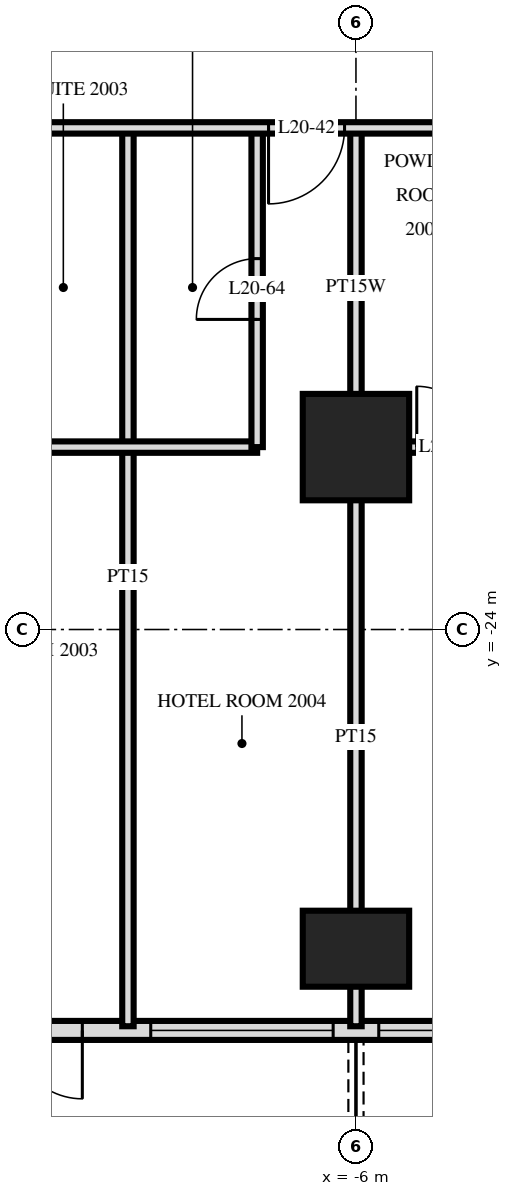
"""IFC4 building model, lengths in metres.
Left out: names, types, materials, properties, quantities, classifications, styles, units other than length and angle.
Written with IfcOpenShell. Run it as: python <this file> out.ifc"""

import sys

from ifc_helpers import new_model, si_unit, direction, frame, frame_2d, origin, origin_2d, place, context, subcontext, project, spatial, rectangle, extrude, element, fill, save


model = new_model("IFC4")
c1 = context("Model", 3, precision=1e-05, world=origin(), true_north=direction((0.0, 1.0)))
c2 = subcontext(c1, "Body", "Model", "MODEL_VIEW")
j1 = project(units=[si_unit("LENGTHUNIT", "METRE"), si_unit("PLANEANGLEUNIT", "RADIAN")], contexts=[c1])
p1 = place(None, origin())
s1 = spatial("IfcSite", under=j1, at=p1, CompositionType="ELEMENT")
p2 = place(p1, origin())
s2 = spatial("IfcBuilding", under=s1, at=p2, CompositionType="ELEMENT")
p3 = place(p2, frame((0.0, 0.0, 81.6)))
s3 = spatial("IfcBuildingStorey", under=s2, at=p3, CompositionType="ELEMENT", Elevation=81.6)
p4 = place(p3, frame((-6.0, -28.2, 0.0), z_axis=(0.0, 0.0, 1.0), x_axis=(1.0, 0.0, 0.0)))
e1 = element("IfcColumn", 1, at=p4, inside=s3, PredefinedType="COLUMN", context=c2, shape_type="SweptSolid", body=[
    extrude(rectangle(XDim=1.4, YDim=1.0, at=origin_2d()), origin(), (0.0, 0.0, 1.0), 3.6),
])
p5 = place(p3, frame((-6.0, -21.6, 0.0), z_axis=(0.0, 0.0, 1.0), x_axis=(1.0, 0.0, 0.0)))
e2 = element("IfcColumn", 2, at=p5, inside=s3, PredefinedType="COLUMN", context=c2, shape_type="SweptSolid", body=[
    extrude(rectangle(XDim=1.4, YDim=1.4, at=origin_2d()), origin(), (0.0, 0.0, 1.0), 3.6),
])
p6 = place(p3, frame((-28.775, -29.275, 0.0), z_axis=(0.0, 0.0, 1.0), x_axis=(1.0, 0.0, 0.0)))
e3 = element("IfcWall", 3, at=p6, inside=s3, PredefinedType="SOLIDWALL", context=c2, shape_type="SweptSolid", body=[
    extrude(rectangle(XDim=57.551, YDim=0.25, at=frame_2d((28.775, 0.0))), origin(), (0.0, 0.0, 1.0), 3.32),
])
p7 = place(p6, frame((0.575, 0.0, 0.0)))
e4 = element("IfcOpeningElement", 4, at=p7, cuts=e3, PredefinedType="OPENING", context=c2, shape_type="SweptSolid", body=[
    extrude(rectangle(XDim=1.8, YDim=2.4, at=frame_2d((0.9, 1.2))), frame((0.0, 0.135, 0.0), z_axis=(0.0, -1.0, 0.0), x_axis=(1.0, 0.0, 0.0)), (0.0, 0.0, 1.0), 0.27),
])
p8 = place(p6, frame((5.375, 0.0, 0.0)))
e5 = element("IfcOpeningElement", 5, at=p8, cuts=e3, PredefinedType="OPENING", context=c2, shape_type="SweptSolid", body=[
    extrude(rectangle(XDim=1.8, YDim=2.4, at=frame_2d((0.9, 1.2))), frame((0.0, 0.135, 0.0), z_axis=(0.0, -1.0, 0.0), x_axis=(1.0, 0.0, 0.0)), (0.0, 0.0, 1.0), 0.27),
])
p9 = place(p6, frame((8.075, 0.0, 0.3)))
e6 = element("IfcOpeningElement", 6, at=p9, cuts=e3, PredefinedType="OPENING", context=c2, shape_type="SweptSolid", body=[
    extrude(rectangle(XDim=2.4, YDim=2.1, at=frame_2d((1.2, 1.05))), frame((0.0, 0.135, 0.0), z_axis=(0.0, -1.0, 0.0), x_axis=(1.0, 0.0, 0.0)), (0.0, 0.0, 1.0), 0.27),
])
p10 = place(p6, frame((12.875, 0.0, 0.0)))
e7 = element("IfcOpeningElement", 7, at=p10, cuts=e3, PredefinedType="OPENING", context=c2, shape_type="SweptSolid", body=[
    extrude(rectangle(XDim=1.8, YDim=2.4, at=frame_2d((0.9, 1.2))), frame((0.0, 0.135, 0.0), z_axis=(0.0, -1.0, 0.0), x_axis=(1.0, 0.0, 0.0)), (0.0, 0.0, 1.0), 0.27),
])
p11 = place(p6, frame((17.375, 0.0, 0.0)))
e8 = element("IfcOpeningElement", 8, at=p11, cuts=e3, PredefinedType="OPENING", context=c2, shape_type="SweptSolid", body=[
    extrude(rectangle(XDim=1.8, YDim=2.4, at=frame_2d((0.9, 1.2))), frame((0.0, 0.135, 0.0), z_axis=(0.0, -1.0, 0.0), x_axis=(1.0, 0.0, 0.0)), (0.0, 0.0, 1.0), 0.27),
])
p12 = place(p6, frame((20.075, 0.0, 0.3)))
e9 = element("IfcOpeningElement", 9, at=p12, cuts=e3, PredefinedType="OPENING", context=c2, shape_type="SweptSolid", body=[
    extrude(rectangle(XDim=2.4, YDim=2.1, at=frame_2d((1.2, 1.05))), frame((0.0, 0.135, 0.0), z_axis=(0.0, -1.0, 0.0), x_axis=(1.0, 0.0, 0.0)), (0.0, 0.0, 1.0), 0.27),
])
p13 = place(p6, frame((23.075, 0.0, 0.3)))
e10 = element("IfcOpeningElement", 10, at=p13, cuts=e3, PredefinedType="OPENING", context=c2, shape_type="SweptSolid", body=[
    extrude(rectangle(XDim=2.4, YDim=2.1, at=frame_2d((1.2, 1.05))), frame((0.0, 0.135, 0.0), z_axis=(0.0, -1.0, 0.0), x_axis=(1.0, 0.0, 0.0)), (0.0, 0.0, 1.0), 0.27),
])
p14 = place(p6, frame((26.375, 0.0, 0.0)))
e11 = element("IfcOpeningElement", 11, at=p14, cuts=e3, PredefinedType="OPENING", context=c2, shape_type="SweptSolid", body=[
    extrude(rectangle(XDim=1.8, YDim=2.4, at=frame_2d((0.9, 1.2))), frame((0.0, 0.135, 0.0), z_axis=(0.0, -1.0, 0.0), x_axis=(1.0, 0.0, 0.0)), (0.0, 0.0, 1.0), 0.27),
])
p15 = place(p6, frame((29.075, 0.0, 0.3)))
e12 = element("IfcOpeningElement", 12, at=p15, cuts=e3, PredefinedType="OPENING", context=c2, shape_type="SweptSolid", body=[
    extrude(rectangle(XDim=2.4, YDim=2.1, at=frame_2d((1.2, 1.05))), frame((0.0, 0.135, 0.0), z_axis=(0.0, -1.0, 0.0), x_axis=(1.0, 0.0, 0.0)), (0.0, 0.0, 1.0), 0.27),
])
p16 = place(p6, frame((32.375, 0.0, 0.0)))
e13 = element("IfcOpeningElement", 13, at=p16, cuts=e3, PredefinedType="OPENING", context=c2, shape_type="SweptSolid", body=[
    extrude(rectangle(XDim=1.8, YDim=2.4, at=frame_2d((0.9, 1.2))), frame((0.0, 0.135, 0.0), z_axis=(0.0, -1.0, 0.0), x_axis=(1.0, 0.0, 0.0)), (0.0, 0.0, 1.0), 0.27),
])
p17 = place(p6, frame((35.375, 0.0, 0.0)))
e14 = element("IfcOpeningElement", 14, at=p17, cuts=e3, PredefinedType="OPENING", context=c2, shape_type="SweptSolid", body=[
    extrude(rectangle(XDim=1.8, YDim=2.4, at=frame_2d((0.9, 1.2))), frame((0.0, 0.135, 0.0), z_axis=(0.0, -1.0, 0.0), x_axis=(1.0, 0.0, 0.0)), (0.0, 0.0, 1.0), 0.27),
])
p18 = place(p6, frame((38.075, 0.0, 0.3)))
e15 = element("IfcOpeningElement", 15, at=p18, cuts=e3, PredefinedType="OPENING", context=c2, shape_type="SweptSolid", body=[
    extrude(rectangle(XDim=2.4, YDim=2.1, at=frame_2d((1.2, 1.05))), frame((0.0, 0.135, 0.0), z_axis=(0.0, -1.0, 0.0), x_axis=(1.0, 0.0, 0.0)), (0.0, 0.0, 1.0), 0.27),
])
p19 = place(p6, frame((41.375, 0.0, 0.0)))
e16 = element("IfcOpeningElement", 16, at=p19, cuts=e3, PredefinedType="OPENING", context=c2, shape_type="SweptSolid", body=[
    extrude(rectangle(XDim=1.8, YDim=2.4, at=frame_2d((0.9, 1.2))), frame((0.0, 0.135, 0.0), z_axis=(0.0, -1.0, 0.0), x_axis=(1.0, 0.0, 0.0)), (0.0, 0.0, 1.0), 0.27),
])
p20 = place(p6, frame((44.075, 0.0, 0.3)))
e17 = element("IfcOpeningElement", 17, at=p20, cuts=e3, PredefinedType="OPENING", context=c2, shape_type="SweptSolid", body=[
    extrude(rectangle(XDim=2.4, YDim=2.1, at=frame_2d((1.2, 1.05))), frame((0.0, 0.135, 0.0), z_axis=(0.0, -1.0, 0.0), x_axis=(1.0, 0.0, 0.0)), (0.0, 0.0, 1.0), 0.27),
])
p21 = place(p6, frame((47.075, 0.0, 0.3)))
e18 = element("IfcOpeningElement", 18, at=p21, cuts=e3, PredefinedType="OPENING", context=c2, shape_type="SweptSolid", body=[
    extrude(rectangle(XDim=2.4, YDim=2.1, at=frame_2d((1.2, 1.05))), frame((0.0, 0.135, 0.0), z_axis=(0.0, -1.0, 0.0), x_axis=(1.0, 0.0, 0.0)), (0.0, 0.0, 1.0), 0.27),
])
p22 = place(p6, frame((50.375, 0.0, 0.0)))
e19 = element("IfcOpeningElement", 19, at=p22, cuts=e3, PredefinedType="OPENING", context=c2, shape_type="SweptSolid", body=[
    extrude(rectangle(XDim=1.8, YDim=2.4, at=frame_2d((0.9, 1.2))), frame((0.0, 0.135, 0.0), z_axis=(0.0, -1.0, 0.0), x_axis=(1.0, 0.0, 0.0)), (0.0, 0.0, 1.0), 0.27),
])
p23 = place(p6, frame((53.375, 0.0, 0.0)))
e20 = element("IfcOpeningElement", 20, at=p23, cuts=e3, PredefinedType="OPENING", context=c2, shape_type="SweptSolid", body=[
    extrude(rectangle(XDim=1.8, YDim=2.4, at=frame_2d((0.9, 1.2))), frame((0.0, 0.135, 0.0), z_axis=(0.0, -1.0, 0.0), x_axis=(1.0, 0.0, 0.0)), (0.0, 0.0, 1.0), 0.27),
])
p24 = place(p3, frame((-6.0, -29.22, 0.0), z_axis=(0.0, 0.0, 1.0), x_axis=(0.0, 1.0, 0.0)))
e21 = element("IfcWall", 21, at=p24, inside=s3, PredefinedType="PARTITIONING", context=c2, shape_type="SweptSolid", body=[
    extrude(rectangle(XDim=7.62, YDim=0.15, at=frame_2d((3.81, 0.0))), origin(), (0.0, 0.0, 1.0), 3.32),
])
p25 = place(p3, frame((-6.0, -21.6, 0.0), z_axis=(0.0, 0.0, 1.0), x_axis=(0.0, 1.0, 0.0)))
e22 = element("IfcWall", 22, at=p25, inside=s3, PredefinedType="PLUMBINGWALL", context=c2, shape_type="SweptSolid", body=[
    extrude(rectangle(XDim=4.2, YDim=0.15, at=frame_2d((2.1, 0.0))), origin(), (0.0, 0.0, 1.0), 3.32),
])
p26 = place(p3, frame((-7.3, -21.6, 0.0), z_axis=(0.0, 0.0, 1.0), x_axis=(0.0, 1.0, 0.0)))
e23 = element("IfcWall", 23, at=p26, inside=s3, PredefinedType="PARTITIONING", context=c2, shape_type="SweptSolid", body=[
    extrude(rectangle(XDim=4.2, YDim=0.15, at=frame_2d((2.1, 0.0))), origin(), (0.0, 0.0, 1.0), 3.32),
])
p27 = place(p26, frame((1.68, 0.0, 0.0)))
e24 = element("IfcOpeningElement", 24, at=p27, cuts=e23, PredefinedType="OPENING", context=c2, shape_type="SweptSolid", body=[
    extrude(rectangle(XDim=0.8, YDim=2.1, at=frame_2d((0.4, 1.05))), frame((0.0, 0.085, 0.0), z_axis=(0.0, -1.0, 0.0), x_axis=(1.0, 0.0, 0.0)), (0.0, 0.0, 1.0), 0.17),
])
p28 = place(p3, frame((-9.0, -29.22, 0.0), z_axis=(0.0, 0.0, 1.0), x_axis=(0.0, 1.0, 0.0)))
e25 = element("IfcWall", 25, at=p28, inside=s3, PredefinedType="PARTITIONING", context=c2, shape_type="SweptSolid", body=[
    extrude(rectangle(XDim=11.82, YDim=0.15, at=frame_2d((5.91, 0.0))), origin(), (0.0, 0.0, 1.0), 3.32),
])
p29 = place(p3, frame((-10.7, -21.6, 0.0), z_axis=(0.0, 0.0, 1.0), x_axis=(1.0, 0.0, 0.0)))
e26 = element("IfcWall", 26, at=p29, inside=s3, PredefinedType="PARTITIONING", context=c2, shape_type="SweptSolid", body=[
    extrude(rectangle(XDim=3.4, YDim=0.15, at=frame_2d((1.7, 0.0))), origin(), (0.0, 0.0, 1.0), 3.32),
])
p30 = place(p3, frame((-6.0, -21.6, 0.0), z_axis=(0.0, 0.0, 1.0), x_axis=(1.0, 0.0, 0.0)))
e27 = element("IfcWall", 27, at=p30, inside=s3, PredefinedType="PLUMBINGWALL", context=c2, shape_type="SweptSolid", body=[
    extrude(rectangle(XDim=1.8, YDim=0.15, at=frame_2d((0.9, 0.0))), origin(), (0.0, 0.0, 1.0), 3.32),
])
p31 = place(p30, frame((0.8, 0.0, 0.0)))
e28 = element("IfcOpeningElement", 28, at=p31, cuts=e27, PredefinedType="OPENING", context=c2, shape_type="SweptSolid", body=[
    extrude(rectangle(XDim=0.8, YDim=2.1, at=frame_2d((0.4, 1.05))), frame((0.0, 0.085, 0.0), z_axis=(0.0, -1.0, 0.0), x_axis=(1.0, 0.0, 0.0)), (0.0, 0.0, 1.0), 0.17),
])
p32 = place(p3, frame((-33.12, -17.4, 0.0), z_axis=(0.0, 0.0, 1.0), x_axis=(1.0, 0.0, 0.0)))
e29 = element("IfcWall", 29, at=p32, inside=s3, PredefinedType="PARTITIONING", context=c2, shape_type="SweptSolid", body=[
    extrude(rectangle(XDim=66.24, YDim=0.15, at=frame_2d((33.12, 0.0))), origin(), (0.0, 0.0, 1.0), 3.32),
])
p33 = place(p32, frame((9.27, 0.0, 0.0)))
e30 = element("IfcOpeningElement", 30, at=p33, cuts=e29, PredefinedType="OPENING", context=c2, shape_type="SweptSolid", body=[
    extrude(rectangle(XDim=1.0, YDim=2.1, at=frame_2d((0.5, 1.05))), frame((0.0, 0.085, 0.0), z_axis=(0.0, -1.0, 0.0), x_axis=(1.0, 0.0, 0.0)), (0.0, 0.0, 1.0), 0.17),
])
p34 = place(p32, frame((13.97, 0.0, 0.0)))
e31 = element("IfcOpeningElement", 31, at=p34, cuts=e29, PredefinedType="OPENING", context=c2, shape_type="SweptSolid", body=[
    extrude(rectangle(XDim=1.0, YDim=2.1, at=frame_2d((0.5, 1.05))), frame((0.0, 0.085, 0.0), z_axis=(0.0, -1.0, 0.0), x_axis=(1.0, 0.0, 0.0)), (0.0, 0.0, 1.0), 0.17),
])
p35 = place(p32, frame((17.62, 0.0, 0.0)))
e32 = element("IfcOpeningElement", 32, at=p35, cuts=e29, PredefinedType="OPENING", context=c2, shape_type="SweptSolid", body=[
    extrude(rectangle(XDim=1.0, YDim=2.1, at=frame_2d((0.5, 1.05))), frame((0.0, 0.085, 0.0), z_axis=(0.0, -1.0, 0.0), x_axis=(1.0, 0.0, 0.0)), (0.0, 0.0, 1.0), 0.17),
])
p36 = place(p32, frame((21.27, 0.0, 0.0)))
e33 = element("IfcOpeningElement", 33, at=p36, cuts=e29, PredefinedType="OPENING", context=c2, shape_type="SweptSolid", body=[
    extrude(rectangle(XDim=1.0, YDim=2.1, at=frame_2d((0.5, 1.05))), frame((0.0, 0.085, 0.0), z_axis=(0.0, -1.0, 0.0), x_axis=(1.0, 0.0, 0.0)), (0.0, 0.0, 1.0), 0.17),
])
p37 = place(p32, frame((25.97, 0.0, 0.0)))
e34 = element("IfcOpeningElement", 34, at=p37, cuts=e29, PredefinedType="OPENING", context=c2, shape_type="SweptSolid", body=[
    extrude(rectangle(XDim=1.0, YDim=2.1, at=frame_2d((0.5, 1.05))), frame((0.0, 0.085, 0.0), z_axis=(0.0, -1.0, 0.0), x_axis=(1.0, 0.0, 0.0)), (0.0, 0.0, 1.0), 0.17),
])
p38 = place(p32, frame((35.62, 0.0, 0.0)))
e35 = element("IfcOpeningElement", 35, at=p38, cuts=e29, PredefinedType="OPENING", context=c2, shape_type="SweptSolid", body=[
    extrude(rectangle(XDim=1.0, YDim=2.1, at=frame_2d((0.5, 1.05))), frame((0.0, 0.085, 0.0), z_axis=(0.0, -1.0, 0.0), x_axis=(1.0, 0.0, 0.0)), (0.0, 0.0, 1.0), 0.17),
])
p39 = place(p32, frame((40.97, 0.0, 0.0)))
e36 = element("IfcOpeningElement", 36, at=p39, cuts=e29, PredefinedType="OPENING", context=c2, shape_type="SweptSolid", body=[
    extrude(rectangle(XDim=1.0, YDim=2.1, at=frame_2d((0.5, 1.05))), frame((0.0, 0.085, 0.0), z_axis=(0.0, -1.0, 0.0), x_axis=(1.0, 0.0, 0.0)), (0.0, 0.0, 1.0), 0.17),
])
p40 = place(p32, frame((42.27, 0.0, 0.0)))
e37 = element("IfcOpeningElement", 37, at=p40, cuts=e29, PredefinedType="OPENING", context=c2, shape_type="SweptSolid", body=[
    extrude(rectangle(XDim=1.0, YDim=2.1, at=frame_2d((0.5, 1.05))), frame((0.0, 0.085, 0.0), z_axis=(0.0, -1.0, 0.0), x_axis=(1.0, 0.0, 0.0)), (0.0, 0.0, 1.0), 0.17),
])
p41 = place(p32, frame((46.97, 0.0, 0.0)))
e38 = element("IfcOpeningElement", 38, at=p41, cuts=e29, PredefinedType="OPENING", context=c2, shape_type="SweptSolid", body=[
    extrude(rectangle(XDim=1.0, YDim=2.1, at=frame_2d((0.5, 1.05))), frame((0.0, 0.085, 0.0), z_axis=(0.0, -1.0, 0.0), x_axis=(1.0, 0.0, 0.0)), (0.0, 0.0, 1.0), 0.17),
])
p42 = place(p32, frame((48.27, 0.0, 0.0)))
e39 = element("IfcOpeningElement", 39, at=p42, cuts=e29, PredefinedType="OPENING", context=c2, shape_type="SweptSolid", body=[
    extrude(rectangle(XDim=1.0, YDim=2.1, at=frame_2d((0.5, 1.05))), frame((0.0, 0.085, 0.0), z_axis=(0.0, -1.0, 0.0), x_axis=(1.0, 0.0, 0.0)), (0.0, 0.0, 1.0), 0.17),
])
p43 = place(p32, frame((1.87, 0.0, 0.0)))
e40 = element("IfcOpeningElement", 40, at=p43, cuts=e29, PredefinedType="OPENING", context=c2, shape_type="SweptSolid", body=[
    extrude(rectangle(XDim=1.0, YDim=2.1, at=frame_2d((0.5, 1.05))), frame((0.0, 0.085, 0.0), z_axis=(0.0, -1.0, 0.0), x_axis=(1.0, 0.0, 0.0)), (0.0, 0.0, 1.0), 0.17),
])
p44 = place(p32, frame((60.37, 0.0, 0.0)))
e41 = element("IfcOpeningElement", 41, at=p44, cuts=e29, PredefinedType="OPENING", context=c2, shape_type="SweptSolid", body=[
    extrude(rectangle(XDim=1.0, YDim=2.1, at=frame_2d((0.5, 1.05))), frame((0.0, 0.085, 0.0), z_axis=(0.0, -1.0, 0.0), x_axis=(1.0, 0.0, 0.0)), (0.0, 0.0, 1.0), 0.17),
])
p45 = place(p11, frame((0.9, 0.0, 0.0), z_axis=(0.0, 0.0, 1.0), x_axis=(-1.0, 0.0, 0.0)))
e42 = element("IfcDoor", 42, at=p45, inside=s3, OperationType="DOUBLE_DOOR_SINGLE_SWING", PredefinedType="DOOR", context=c2, shape_type="SweptSolid", body=[
    extrude(rectangle(XDim=1.8, YDim=2.4, at=frame_2d((0.0, 1.2))), frame((0.0, -0.025, 0.0), z_axis=(0.0, 1.0, 0.0), x_axis=(-1.0, 0.0, 0.0)), (0.0, 0.0, 1.0), 0.05),
])
fill(e8, e42)
p46 = place(p12, origin())
e43 = element("IfcWindow", 43, at=p46, inside=s3, PartitioningType="SINGLE_PANEL", PredefinedType="WINDOW", context=c2, shape_type="SweptSolid", body=[
    extrude(rectangle(XDim=2.4, YDim=2.1, at=frame_2d((1.2, 1.05))), frame((0.0, 0.03, 0.0), z_axis=(0.0, -1.0, 0.0), x_axis=(1.0, 0.0, 0.0)), (0.0, 0.0, 1.0), 0.06),
])
fill(e9, e43)
p47 = place(p13, origin())
e44 = element("IfcWindow", 44, at=p47, inside=s3, PartitioningType="SINGLE_PANEL", PredefinedType="WINDOW", context=c2, shape_type="SweptSolid", body=[
    extrude(rectangle(XDim=2.4, YDim=2.1, at=frame_2d((1.2, 1.05))), frame((0.0, 0.03, 0.0), z_axis=(0.0, -1.0, 0.0), x_axis=(1.0, 0.0, 0.0)), (0.0, 0.0, 1.0), 0.06),
])
fill(e10, e44)
p48 = place(p37, frame((0.5, 0.0, 0.0), z_axis=(0.0, 0.0, 1.0), x_axis=(-1.0, 0.0, 0.0)))
e45 = element("IfcDoor", 45, at=p48, inside=s3, OperationType="SINGLE_SWING_LEFT", PredefinedType="DOOR", context=c2, shape_type="SweptSolid", body=[
    extrude(rectangle(XDim=1.0, YDim=2.1, at=frame_2d((0.0, 1.05))), frame((0.0, -0.025, 0.0), z_axis=(0.0, 1.0, 0.0), x_axis=(-1.0, 0.0, 0.0)), (0.0, 0.0, 1.0), 0.05),
])
fill(e34, e45)
p49 = place(p27, origin())
e46 = element("IfcDoor", 46, at=p49, inside=s3, OperationType="SINGLE_SWING_RIGHT", PredefinedType="DOOR", context=c2, shape_type="SweptSolid", body=[
    extrude(rectangle(XDim=0.8, YDim=2.1, at=frame_2d((0.4, 1.05))), frame((0.0, 0.025, 0.0), z_axis=(0.0, -1.0, 0.0), x_axis=(1.0, 0.0, 0.0)), (0.0, 0.0, 1.0), 0.05),
])
fill(e24, e46)
p50 = place(p31, origin())
e47 = element("IfcDoor", 47, at=p50, inside=s3, OperationType="SINGLE_SWING_RIGHT", PredefinedType="DOOR", context=c2, shape_type="SweptSolid", body=[
    extrude(rectangle(XDim=0.8, YDim=2.1, at=frame_2d((0.4, 1.05))), frame((0.0, 0.025, 0.0), z_axis=(0.0, -1.0, 0.0), x_axis=(1.0, 0.0, 0.0)), (0.0, 0.0, 1.0), 0.05),
])
fill(e28, e47)
save(model, sys.argv[1])
